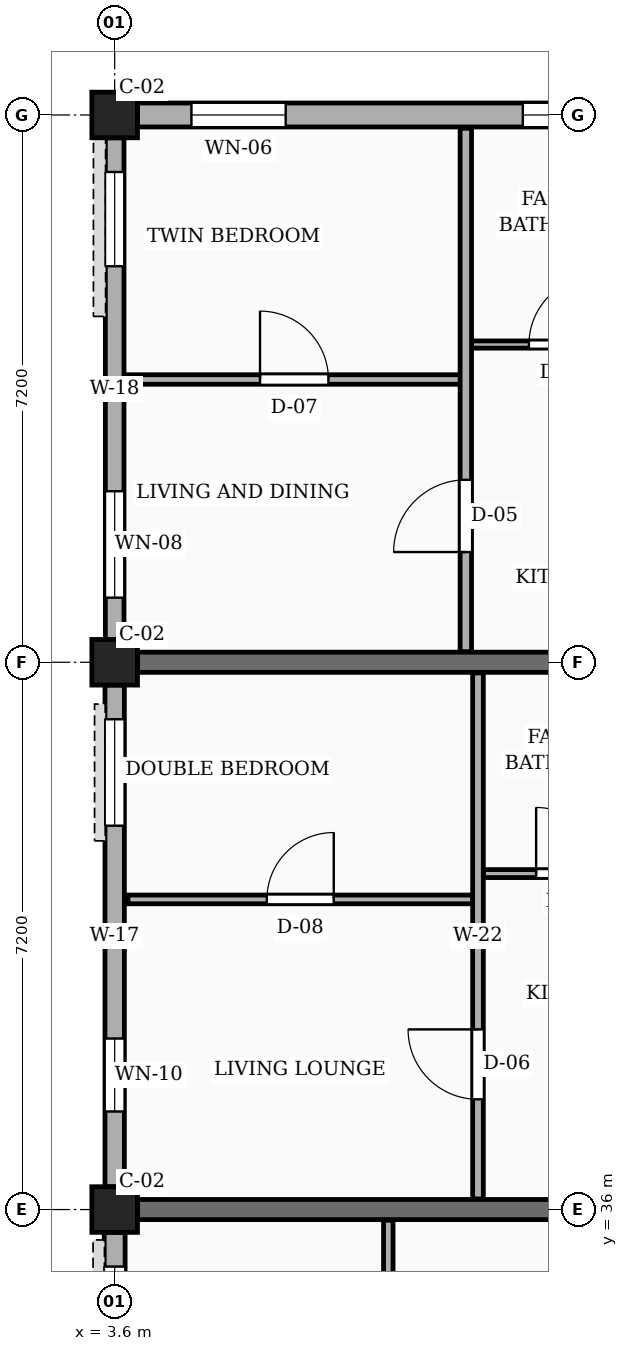
"""IFC4 building model, lengths in metres.
Left out: names, types, materials, properties, quantities, classifications, styles, units other than length and angle.
Written with IfcOpenShell. Run it as: python <this file> out.ifc"""

import sys

from ifc_helpers import new_model, si_unit, direction, frame, frame_2d, origin, origin_2d, place, context, subcontext, project, spatial, rectangle, extrude, element, fill, save


model = new_model("IFC4")
c1 = context("Model", 3, precision=1e-05, world=origin(), true_north=direction((0.0, 1.0)))
c2 = subcontext(c1, "Body", "Model", "MODEL_VIEW")
j1 = project(units=[si_unit("LENGTHUNIT", "METRE"), si_unit("PLANEANGLEUNIT", "RADIAN")], contexts=[c1])
p1 = place(None, origin())
s1 = spatial("IfcSite", under=j1, at=p1, CompositionType="ELEMENT")
p2 = place(p1, origin())
s2 = spatial("IfcBuilding", under=s1, at=p2, CompositionType="ELEMENT")
p3 = place(p2, frame((0.0, 0.0, 4.5)))
s3 = spatial("IfcBuildingStorey", under=s2, at=p3, CompositionType="ELEMENT", Elevation=4.5)
for number, where, z_axis, x_axis in (
    (1, (3.6, 36.0, 0.0), (0.0, 0.0, 1.0), (1.0, 0.0, 0.0)),
    (2, (3.6, 43.2, 0.0), (0.0, 0.0, 1.0), (1.0, 0.0, 0.0)),
    (3, (3.6, 50.4, 0.0), (0.0, 0.0, 1.0), (1.0, 0.0, 0.0)),
):
    element("IfcColumn", number, at=place(p3, frame(where, z_axis=z_axis, x_axis=x_axis)), inside=s3, PredefinedType="COLUMN", context=c2, shape_type="SweptSolid", body=[
        extrude(rectangle(XDim=0.6, YDim=0.6, at=origin_2d()), origin(), (0.0, 0.0, 1.0), 3.15),
    ])
for number, where, z_axis, x_axis in (
    (4, (3.9, 36.0, 0.0), (0.0, 0.0, 1.0), (1.0, 0.0, 0.0)),
    (5, (3.9, 43.2, 0.0), (0.0, 0.0, 1.0), (1.0, 0.0, 0.0)),
):
    element("IfcWall", number, at=place(p3, frame(where, z_axis=z_axis, x_axis=x_axis)), inside=s3, PredefinedType="SOLIDWALL", context=c2, shape_type="SweptSolid", body=[
        extrude(rectangle(XDim=6.575, YDim=0.265, at=frame_2d((3.288, 0.0))), origin(), (0.0, 0.0, 1.0), 2.17),
    ])
p4 = place(p3, frame((10.5, 50.4, 0.0), z_axis=(0.0, 0.0, 1.0), x_axis=(-1.0, 0.0, 0.0)))
e6 = element("IfcWall", 6, at=p4, inside=s3, PredefinedType="SOLIDWALL", context=c2, shape_type="SweptSolid", body=[
    extrude(rectangle(XDim=6.6, YDim=0.315, at=frame_2d((3.3, 0.0))), origin(), (0.0, 0.0, 1.0), 2.44),
])
p5 = place(p4, frame((0.45, 0.0, 0.78)))
e7 = element("IfcOpeningElement", 7, at=p5, cuts=e6, PredefinedType="OPENING", context=c2, shape_type="SweptSolid", body=[
    extrude(rectangle(XDim=1.08, YDim=1.15, at=frame_2d((0.54, 0.575))), frame((0.0, 0.167, 0.0), z_axis=(0.0, -1.0, 0.0), x_axis=(1.0, 0.0, 0.0)), (0.0, 0.0, 1.0), 0.335),
])
p6 = place(p4, frame((4.65, 0.0, 0.78)))
e8 = element("IfcOpeningElement", 8, at=p6, cuts=e6, PredefinedType="OPENING", context=c2, shape_type="SweptSolid", body=[
    extrude(rectangle(XDim=1.24, YDim=1.15, at=frame_2d((0.62, 0.575))), frame((0.0, 0.167, 0.0), z_axis=(0.0, -1.0, 0.0), x_axis=(1.0, 0.0, 0.0)), (0.0, 0.0, 1.0), 0.335),
])
p7 = place(p3, frame((3.6, 50.1, 0.0), z_axis=(0.0, 0.0, 1.0), x_axis=(0.0, -1.0, 0.0)))
e9 = element("IfcWall", 9, at=p7, inside=s3, PredefinedType="SOLIDWALL", context=c2, shape_type="SweptSolid", body=[
    extrude(rectangle(XDim=6.6, YDim=0.245, at=frame_2d((3.3, 0.0))), origin(), (0.0, 0.0, 1.0), 2.44),
])
p8 = place(p7, frame((0.45, 0.0, 0.78)))
e10 = element("IfcOpeningElement", 10, at=p8, cuts=e9, PredefinedType="OPENING", context=c2, shape_type="SweptSolid", body=[
    extrude(rectangle(XDim=1.24, YDim=1.15, at=frame_2d((0.62, 0.575))), frame((0.0, 0.133, 0.0), z_axis=(0.0, -1.0, 0.0), x_axis=(1.0, 0.0, 0.0)), (0.0, 0.0, 1.0), 0.265),
])
p9 = place(p7, frame((4.65, 0.0, 0.78)))
e11 = element("IfcOpeningElement", 11, at=p9, cuts=e9, PredefinedType="OPENING", context=c2, shape_type="SweptSolid", body=[
    extrude(rectangle(XDim=1.4, YDim=1.15, at=frame_2d((0.7, 0.575))), frame((0.0, 0.133, 0.0), z_axis=(0.0, -1.0, 0.0), x_axis=(1.0, 0.0, 0.0)), (0.0, 0.0, 1.0), 0.265),
])
p10 = place(p3, frame((3.6, 42.9, 0.0), z_axis=(0.0, 0.0, 1.0), x_axis=(0.0, -1.0, 0.0)))
e12 = element("IfcWall", 12, at=p10, inside=s3, PredefinedType="SOLIDWALL", context=c2, shape_type="SweptSolid", body=[
    extrude(rectangle(XDim=6.6, YDim=0.255, at=frame_2d((3.3, 0.0))), origin(), (0.0, 0.0, 1.0), 2.44),
])
p11 = place(p10, frame((0.45, 0.0, 0.78)))
e13 = element("IfcOpeningElement", 13, at=p11, cuts=e12, PredefinedType="OPENING", context=c2, shape_type="SweptSolid", body=[
    extrude(rectangle(XDim=1.4, YDim=1.15, at=frame_2d((0.7, 0.575))), frame((0.0, 0.137, 0.0), z_axis=(0.0, -1.0, 0.0), x_axis=(1.0, 0.0, 0.0)), (0.0, 0.0, 1.0), 0.275),
])
p12 = place(p10, frame((4.65, 0.0, 0.78)))
e14 = element("IfcOpeningElement", 14, at=p12, cuts=e12, PredefinedType="OPENING", context=c2, shape_type="SweptSolid", body=[
    extrude(rectangle(XDim=0.96, YDim=1.26, at=frame_2d((0.48, 0.63))), frame((0.0, 0.137, 0.0), z_axis=(0.0, -1.0, 0.0), x_axis=(1.0, 0.0, 0.0)), (0.0, 0.0, 1.0), 0.275),
])
p13 = place(p3, frame((3.6, 35.7, 0.0), z_axis=(0.0, 0.0, 1.0), x_axis=(0.0, -1.0, 0.0)))
e15 = element("IfcWall", 15, at=p13, inside=s3, PredefinedType="SOLIDWALL", context=c2, shape_type="SweptSolid", body=[
    extrude(rectangle(XDim=6.6, YDim=0.275, at=frame_2d((3.3, 0.0))), origin(), (0.0, 0.0, 1.0), 2.44),
])
p14 = place(p13, frame((0.45, 0.0, 0.78)))
e16 = element("IfcOpeningElement", 16, at=p14, cuts=e15, PredefinedType="OPENING", context=c2, shape_type="SweptSolid", body=[
    extrude(rectangle(XDim=0.96, YDim=1.26, at=frame_2d((0.48, 0.63))), frame((0.0, 0.147, 0.0), z_axis=(0.0, -1.0, 0.0), x_axis=(1.0, 0.0, 0.0)), (0.0, 0.0, 1.0), 0.295),
])
p15 = place(p13, frame((4.65, 0.0, 0.78)))
e17 = element("IfcOpeningElement", 17, at=p15, cuts=e15, PredefinedType="OPENING", context=c2, shape_type="SweptSolid", body=[
    extrude(rectangle(XDim=1.12, YDim=1.26, at=frame_2d((0.56, 0.63))), frame((0.0, 0.147, 0.0), z_axis=(0.0, -1.0, 0.0), x_axis=(1.0, 0.0, 0.0)), (0.0, 0.0, 1.0), 0.295),
])
p16 = place(p3, frame((7.2, 28.94, 0.0), z_axis=(0.0, 0.0, 1.0), x_axis=(0.0, 1.0, 0.0)))
e18 = element("IfcWall", 18, at=p16, inside=s3, PredefinedType="PARTITIONING", context=c2, shape_type="SweptSolid", body=[
    extrude(rectangle(XDim=6.92, YDim=0.125, at=frame_2d((3.46, 0.0))), origin(), (0.0, 0.0, 1.0), 2.305),
])
p17 = place(p16, frame((1.05, 0.0, 0.0)))
e19 = element("IfcOpeningElement", 19, at=p17, cuts=e18, PredefinedType="OPENING", context=c2, shape_type="SweptSolid", body=[
    extrude(rectangle(XDim=0.87, YDim=2.05, at=frame_2d((0.435, 1.025))), frame((0.0, 0.073, 0.0), z_axis=(0.0, -1.0, 0.0), x_axis=(1.0, 0.0, 0.0)), (0.0, 0.0, 1.0), 0.145),
])
p18 = place(p16, frame((4.45, 0.0, 0.0)))
e20 = element("IfcOpeningElement", 20, at=p18, cuts=e18, PredefinedType="OPENING", context=c2, shape_type="SweptSolid", body=[
    extrude(rectangle(XDim=0.88, YDim=2.08, at=frame_2d((0.44, 1.04))), frame((0.0, 0.073, 0.0), z_axis=(0.0, -1.0, 0.0), x_axis=(1.0, 0.0, 0.0)), (0.0, 0.0, 1.0), 0.145),
])
p19 = place(p3, frame((3.775, 40.08, 0.0), z_axis=(0.0, 0.0, 1.0), x_axis=(1.0, 0.0, 0.0)))
e21 = element("IfcWall", 21, at=p19, inside=s3, PredefinedType="PARTITIONING", context=c2, shape_type="SweptSolid", body=[
    extrude(rectangle(XDim=4.535, YDim=0.115, at=frame_2d((2.268, 0.0))), origin(), (0.0, 0.0, 1.0), 2.305),
])
p20 = place(p19, frame((1.827, 0.0, 0.0)))
e22 = element("IfcOpeningElement", 22, at=p20, cuts=e21, PredefinedType="OPENING", context=c2, shape_type="SweptSolid", body=[
    extrude(rectangle(XDim=0.88, YDim=2.08, at=frame_2d((0.44, 1.04))), frame((0.0, 0.067, 0.0), z_axis=(0.0, -1.0, 0.0), x_axis=(1.0, 0.0, 0.0)), (0.0, 0.0, 1.0), 0.135),
])
p21 = place(p3, frame((8.45, 40.42, 0.0), z_axis=(0.0, 0.0, 1.0), x_axis=(1.0, 0.0, 0.0)))
e23 = element("IfcWall", 23, at=p21, inside=s3, PredefinedType="PARTITIONING", context=c2, shape_type="SweptSolid", body=[
    extrude(rectangle(XDim=2.26, YDim=0.105, at=frame_2d((1.13, 0.0))), origin(), (0.0, 0.0, 1.0), 2.305),
])
p22 = place(p21, frame((0.695, 0.0, 0.0)))
e24 = element("IfcOpeningElement", 24, at=p22, cuts=e23, PredefinedType="OPENING", context=c2, shape_type="SweptSolid", body=[
    extrude(rectangle(XDim=0.87, YDim=2.05, at=frame_2d((0.435, 1.025))), frame((0.0, 0.062, 0.0), z_axis=(0.0, -1.0, 0.0), x_axis=(1.0, 0.0, 0.0)), (0.0, 0.0, 1.0), 0.125),
])
p23 = place(p3, frame((8.38, 36.14, 0.0), z_axis=(0.0, 0.0, 1.0), x_axis=(0.0, 1.0, 0.0)))
e25 = element("IfcWall", 25, at=p23, inside=s3, PredefinedType="PARTITIONING", context=c2, shape_type="SweptSolid", body=[
    extrude(rectangle(XDim=6.92, YDim=0.14, at=frame_2d((3.46, 0.0))), origin(), (0.0, 0.0, 1.0), 2.305),
])
p24 = place(p23, frame((1.31, 0.0, 0.0)))
e26 = element("IfcOpeningElement", 26, at=p24, cuts=e25, PredefinedType="OPENING", context=c2, shape_type="SweptSolid", body=[
    extrude(rectangle(XDim=0.92, YDim=2.1, at=frame_2d((0.46, 1.05))), frame((0.0, 0.08, 0.0), z_axis=(0.0, -1.0, 0.0), x_axis=(1.0, 0.0, 0.0)), (0.0, 0.0, 1.0), 0.16),
])
p25 = place(p3, frame((3.775, 46.92, 0.0), z_axis=(0.0, 0.0, 1.0), x_axis=(1.0, 0.0, 0.0)))
e27 = element("IfcWall", 27, at=p25, inside=s3, PredefinedType="PARTITIONING", context=c2, shape_type="SweptSolid", body=[
    extrude(rectangle(XDim=4.375, YDim=0.125, at=frame_2d((2.188, 0.0))), origin(), (0.0, 0.0, 1.0), 2.305),
])
p26 = place(p25, frame((1.738, 0.0, 0.0)))
e28 = element("IfcOpeningElement", 28, at=p26, cuts=e27, PredefinedType="OPENING", context=c2, shape_type="SweptSolid", body=[
    extrude(rectangle(XDim=0.9, YDim=2.1, at=frame_2d((0.45, 1.05))), frame((0.0, 0.073, 0.0), z_axis=(0.0, -1.0, 0.0), x_axis=(1.0, 0.0, 0.0)), (0.0, 0.0, 1.0), 0.145),
])
p27 = place(p3, frame((8.29, 47.38, 0.0), z_axis=(0.0, 0.0, 1.0), x_axis=(1.0, 0.0, 0.0)))
e29 = element("IfcWall", 29, at=p27, inside=s3, PredefinedType="PARTITIONING", context=c2, shape_type="SweptSolid", body=[
    extrude(rectangle(XDim=2.42, YDim=0.095, at=frame_2d((1.21, 0.0))), origin(), (0.0, 0.0, 1.0), 2.305),
])
p28 = place(p27, frame((0.76, 0.0, 0.0)))
e30 = element("IfcOpeningElement", 30, at=p28, cuts=e29, PredefinedType="OPENING", context=c2, shape_type="SweptSolid", body=[
    extrude(rectangle(XDim=0.9, YDim=2.05, at=frame_2d((0.45, 1.025))), frame((0.0, 0.058, 0.0), z_axis=(0.0, -1.0, 0.0), x_axis=(1.0, 0.0, 0.0)), (0.0, 0.0, 1.0), 0.115),
])
p29 = place(p3, frame((8.22, 43.34, 0.0), z_axis=(0.0, 0.0, 1.0), x_axis=(0.0, 1.0, 0.0)))
e31 = element("IfcWall", 31, at=p29, inside=s3, PredefinedType="PARTITIONING", context=c2, shape_type="SweptSolid", body=[
    extrude(rectangle(XDim=6.885, YDim=0.15, at=frame_2d((3.442, 0.0))), origin(), (0.0, 0.0, 1.0), 2.305),
])
p30 = place(p29, frame((1.31, 0.0, 0.0)))
e32 = element("IfcOpeningElement", 32, at=p30, cuts=e31, PredefinedType="OPENING", context=c2, shape_type="SweptSolid", body=[
    extrude(rectangle(XDim=0.95, YDim=2.1, at=frame_2d((0.475, 1.05))), frame((0.0, 0.085, 0.0), z_axis=(0.0, -1.0, 0.0), x_axis=(1.0, 0.0, 0.0)), (0.0, 0.0, 1.0), 0.17),
])
p31 = place(p5, origin())
e33 = element("IfcWindow", 33, at=p31, inside=s3, PartitioningType="SINGLE_PANEL", PredefinedType="WINDOW", context=c2, shape_type="SweptSolid", body=[
    extrude(rectangle(XDim=1.08, YDim=1.15, at=frame_2d((0.54, 0.575))), frame((0.0, 0.03, 0.0), z_axis=(0.0, -1.0, 0.0), x_axis=(1.0, 0.0, 0.0)), (0.0, 0.0, 1.0), 0.06),
])
fill(e7, e33)
p32 = place(p6, origin())
e34 = element("IfcWindow", 34, at=p32, inside=s3, PartitioningType="SINGLE_PANEL", PredefinedType="WINDOW", context=c2, shape_type="SweptSolid", body=[
    extrude(rectangle(XDim=1.24, YDim=1.15, at=frame_2d((0.62, 0.575))), frame((0.0, 0.03, 0.0), z_axis=(0.0, -1.0, 0.0), x_axis=(1.0, 0.0, 0.0)), (0.0, 0.0, 1.0), 0.06),
])
fill(e8, e34)
p33 = place(p8, origin())
e35 = element("IfcWindow", 35, at=p33, inside=s3, PartitioningType="SINGLE_PANEL", PredefinedType="WINDOW", context=c2, shape_type="SweptSolid", body=[
    extrude(rectangle(XDim=1.24, YDim=1.15, at=frame_2d((0.62, 0.575))), frame((0.0, 0.03, 0.0), z_axis=(0.0, -1.0, 0.0), x_axis=(1.0, 0.0, 0.0)), (0.0, 0.0, 1.0), 0.06),
])
fill(e10, e35)
p34 = place(p9, origin())
e36 = element("IfcWindow", 36, at=p34, inside=s3, PartitioningType="SINGLE_PANEL", PredefinedType="WINDOW", context=c2, shape_type="SweptSolid", body=[
    extrude(rectangle(XDim=1.4, YDim=1.15, at=frame_2d((0.7, 0.575))), frame((0.0, 0.03, 0.0), z_axis=(0.0, -1.0, 0.0), x_axis=(1.0, 0.0, 0.0)), (0.0, 0.0, 1.0), 0.06),
])
fill(e11, e36)
p35 = place(p11, origin())
e37 = element("IfcWindow", 37, at=p35, inside=s3, PartitioningType="SINGLE_PANEL", PredefinedType="WINDOW", context=c2, shape_type="SweptSolid", body=[
    extrude(rectangle(XDim=1.4, YDim=1.15, at=frame_2d((0.7, 0.575))), frame((0.0, 0.03, 0.0), z_axis=(0.0, -1.0, 0.0), x_axis=(1.0, 0.0, 0.0)), (0.0, 0.0, 1.0), 0.06),
])
fill(e13, e37)
p36 = place(p12, origin())
e38 = element("IfcWindow", 38, at=p36, inside=s3, PartitioningType="SINGLE_PANEL", PredefinedType="WINDOW", context=c2, shape_type="SweptSolid", body=[
    extrude(rectangle(XDim=0.96, YDim=1.26, at=frame_2d((0.48, 0.63))), frame((0.0, 0.03, 0.0), z_axis=(0.0, -1.0, 0.0), x_axis=(1.0, 0.0, 0.0)), (0.0, 0.0, 1.0), 0.06),
])
fill(e14, e38)
p37 = place(p14, origin())
e39 = element("IfcWindow", 39, at=p37, inside=s3, PartitioningType="SINGLE_PANEL", PredefinedType="WINDOW", context=c2, shape_type="SweptSolid", body=[
    extrude(rectangle(XDim=0.96, YDim=1.26, at=frame_2d((0.48, 0.63))), frame((0.0, 0.03, 0.0), z_axis=(0.0, -1.0, 0.0), x_axis=(1.0, 0.0, 0.0)), (0.0, 0.0, 1.0), 0.06),
])
fill(e16, e39)
p38 = place(p20, origin())
e40 = element("IfcDoor", 40, at=p38, inside=s3, OperationType="SINGLE_SWING_RIGHT", PredefinedType="DOOR", context=c2, shape_type="SweptSolid", body=[
    extrude(rectangle(XDim=0.88, YDim=2.08, at=frame_2d((0.44, 1.04))), frame((0.0, 0.025, 0.0), z_axis=(0.0, -1.0, 0.0), x_axis=(1.0, 0.0, 0.0)), (0.0, 0.0, 1.0), 0.05),
])
fill(e22, e40)
p39 = place(p22, origin())
e41 = element("IfcDoor", 41, at=p39, inside=s3, OperationType="SINGLE_SWING_LEFT", PredefinedType="DOOR", context=c2, shape_type="SweptSolid", body=[
    extrude(rectangle(XDim=0.87, YDim=2.05, at=frame_2d((0.435, 1.025))), frame((0.0, 0.025, 0.0), z_axis=(0.0, -1.0, 0.0), x_axis=(1.0, 0.0, 0.0)), (0.0, 0.0, 1.0), 0.05),
])
fill(e24, e41)
p40 = place(p24, origin())
e42 = element("IfcDoor", 42, at=p40, inside=s3, OperationType="SINGLE_SWING_RIGHT", PredefinedType="DOOR", context=c2, shape_type="SweptSolid", body=[
    extrude(rectangle(XDim=0.92, YDim=2.1, at=frame_2d((0.46, 1.05))), frame((0.0, 0.025, 0.0), z_axis=(0.0, -1.0, 0.0), x_axis=(1.0, 0.0, 0.0)), (0.0, 0.0, 1.0), 0.05),
])
fill(e26, e42)
p41 = place(p26, origin())
e43 = element("IfcDoor", 43, at=p41, inside=s3, OperationType="SINGLE_SWING_LEFT", PredefinedType="DOOR", context=c2, shape_type="SweptSolid", body=[
    extrude(rectangle(XDim=0.9, YDim=2.1, at=frame_2d((0.45, 1.05))), frame((0.0, 0.025, 0.0), z_axis=(0.0, -1.0, 0.0), x_axis=(1.0, 0.0, 0.0)), (0.0, 0.0, 1.0), 0.05),
])
fill(e28, e43)
p42 = place(p28, origin())
e44 = element("IfcDoor", 44, at=p42, inside=s3, OperationType="SINGLE_SWING_RIGHT", PredefinedType="DOOR", context=c2, shape_type="SweptSolid", body=[
    extrude(rectangle(XDim=0.9, YDim=2.05, at=frame_2d((0.45, 1.025))), frame((0.0, 0.025, 0.0), z_axis=(0.0, -1.0, 0.0), x_axis=(1.0, 0.0, 0.0)), (0.0, 0.0, 1.0), 0.05),
])
fill(e30, e44)
p43 = place(p30, origin())
e45 = element("IfcDoor", 45, at=p43, inside=s3, OperationType="SINGLE_SWING_LEFT", PredefinedType="DOOR", context=c2, shape_type="SweptSolid", body=[
    extrude(rectangle(XDim=0.95, YDim=2.1, at=frame_2d((0.475, 1.05))), frame((0.0, 0.025, 0.0), z_axis=(0.0, -1.0, 0.0), x_axis=(1.0, 0.0, 0.0)), (0.0, 0.0, 1.0), 0.05),
])
fill(e32, e45)
save(model, sys.argv[1])
